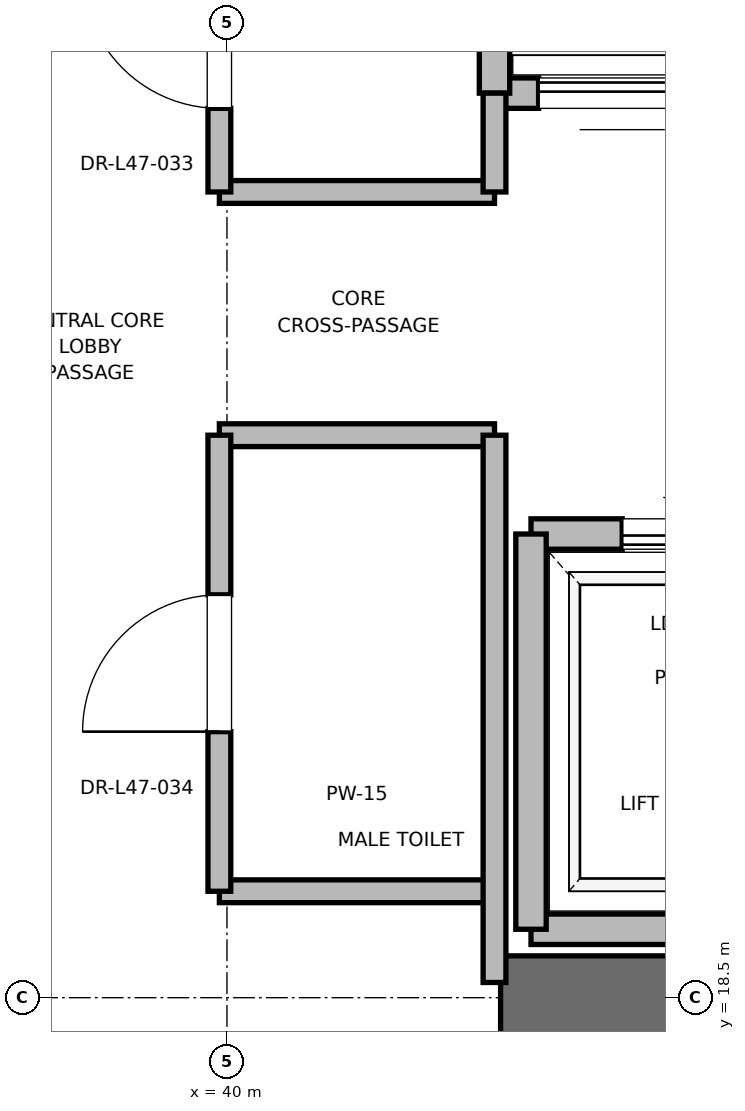
"""IFC4 building model, lengths in metres.
Left out: names, types, materials, properties, quantities, classifications, styles, units other than length and angle.
Written with IfcOpenShell. Run it as: python <this file> out.ifc"""

import sys

from ifc_helpers import new_model, si_unit, direction, frame, frame_2d, origin, place, context, subcontext, project, spatial, rectangle, extrude, element, fill, save


model = new_model("IFC4")
c1 = context("Model", 3, precision=1e-05, world=origin(), true_north=direction((0.0, 1.0)))
c2 = subcontext(c1, "Body", "Model", "MODEL_VIEW")
j1 = project(units=[si_unit("LENGTHUNIT", "METRE"), si_unit("PLANEANGLEUNIT", "RADIAN")], contexts=[c1])
p1 = place(None, origin())
s1 = spatial("IfcSite", under=j1, at=p1, CompositionType="ELEMENT")
p2 = place(p1, origin())
s2 = spatial("IfcBuilding", under=s1, at=p2, CompositionType="ELEMENT")
p3 = place(p2, frame((0.0, 0.0, 205.2)))
s3 = spatial("IfcBuildingStorey", under=s2, at=p3, CompositionType="ELEMENT", Elevation=205.2)
p4 = place(p3, frame((41.8, 18.5, 0.0), z_axis=(0.0, 0.0, 1.0), x_axis=(1.0, 0.0, 0.0)))
e1 = element("IfcWall", 1, at=p4, inside=s3, PredefinedType="SHEAR", context=c2, shape_type="SweptSolid", body=[
    extrude(rectangle(XDim=9.2, YDim=0.55, at=frame_2d((4.6, 0.0))), origin(), (0.0, 0.0, 1.0), 3.775),
])
p5 = place(p3, frame((42.0, 18.95, 0.0), z_axis=(0.0, 0.0, 1.0), x_axis=(1.0, 0.0, 0.0)))
e2 = element("IfcWall", 2, at=p5, inside=s3, PredefinedType="SOLIDWALL", context=c2, shape_type="SweptSolid", body=[
    extrude(rectangle(XDim=2.3, YDim=0.2, at=frame_2d((1.15, 0.0))), origin(), (0.0, 0.0, 1.0), 2.755),
])
p6 = place(p3, frame((44.3, 21.55, 0.0), z_axis=(0.0, 0.0, 1.0), x_axis=(-1.0, 0.0, 0.0)))
e3 = element("IfcWall", 3, at=p6, inside=s3, PredefinedType="SOLIDWALL", context=c2, shape_type="SweptSolid", body=[
    extrude(rectangle(XDim=2.3, YDim=0.2, at=frame_2d((1.15, 0.0))), origin(), (0.0, 0.0, 1.0), 3.775),
])
p7 = place(p6, frame((0.6, 0.0, 0.0)))
e4 = element("IfcOpeningElement", 4, at=p7, cuts=e3, PredefinedType="OPENING", context=c2, shape_type="SweptSolid", body=[
    extrude(rectangle(XDim=1.1, YDim=2.2, at=frame_2d((0.55, 1.1))), frame((0.0, 0.1, 0.0), z_axis=(0.0, -1.0, 0.0), x_axis=(1.0, 0.0, 0.0)), (0.0, 0.0, 1.0), 0.2),
])
p8 = place(p3, frame((42.0, 21.55, 0.0), z_axis=(0.0, 0.0, 1.0), x_axis=(0.0, -1.0, 0.0)))
e5 = element("IfcWall", 5, at=p8, inside=s3, PredefinedType="SOLIDWALL", context=c2, shape_type="SweptSolid", body=[
    extrude(rectangle(XDim=2.6, YDim=0.2, at=frame_2d((1.3, 0.0))), origin(), (0.0, 0.0, 1.0), 2.755),
])
p9 = place(p3, frame((41.76, 24.45, 0.0), z_axis=(0.0, 0.0, 1.0), x_axis=(1.0, 0.0, 0.0)))
e6 = element("IfcWall", 6, at=p9, inside=s3, PredefinedType="SOLIDWALL", context=c2, shape_type="SweptSolid", body=[
    extrude(rectangle(XDim=1.68, YDim=0.2, at=frame_2d((0.84, 0.0))), origin(), (0.0, 0.0, 1.0), 3.775),
])
p10 = place(p9, frame((0.29, 0.0, 0.0)))
e7 = element("IfcOpeningElement", 7, at=p10, cuts=e6, PredefinedType="OPENING", context=c2, shape_type="SweptSolid", body=[
    extrude(rectangle(XDim=1.1, YDim=2.2, at=frame_2d((0.55, 1.1))), frame((0.0, 0.1, 0.0), z_axis=(0.0, -1.0, 0.0), x_axis=(1.0, 0.0, 0.0)), (0.0, 0.0, 1.0), 0.2),
])
p11 = place(p3, frame((41.76, 27.05, 0.0), z_axis=(0.0, 0.0, 1.0), x_axis=(0.0, -1.0, 0.0)))
e8 = element("IfcWall", 8, at=p11, inside=s3, PredefinedType="SOLIDWALL", context=c2, shape_type="SweptSolid", body=[
    extrude(rectangle(XDim=2.6, YDim=0.2, at=frame_2d((1.3, 0.0))), origin(), (0.0, 0.0, 1.0), 3.775),
])
for number, where, z_axis, x_axis in (
    (9, (39.95, 19.2, 0.0), (0.0, 0.0, 1.0), (1.0, 0.0, 0.0)),
    (10, (39.95, 22.2, 0.0), (0.0, 0.0, 1.0), (1.0, 0.0, 0.0)),
    (11, (39.95, 23.8, 0.0), (0.0, 0.0, 1.0), (1.0, 0.0, 0.0)),
):
    element("IfcWall", number, at=place(p3, frame(where, z_axis=z_axis, x_axis=x_axis)), inside=s3, PredefinedType="PARTITIONING", context=c2, shape_type="SweptSolid", body=[
        extrude(rectangle(XDim=1.81, YDim=0.15, at=frame_2d((0.905, 0.0))), origin(), (0.0, 0.0, 1.0), 2.85),
    ])
p12 = place(p3, frame((41.76, 18.6, 0.0), z_axis=(0.0, 0.0, 1.0), x_axis=(0.0, 1.0, 0.0)))
e12 = element("IfcWall", 12, at=p12, inside=s3, PredefinedType="PARTITIONING", context=c2, shape_type="SweptSolid", body=[
    extrude(rectangle(XDim=3.6, YDim=0.15, at=frame_2d((1.8, 0.0))), origin(), (0.0, 0.0, 1.0), 2.755),
])
p13 = place(p3, frame((41.76, 23.8, 0.0), z_axis=(0.0, 0.0, 1.0), x_axis=(0.0, 1.0, 0.0)))
e13 = element("IfcWall", 13, at=p13, inside=s3, PredefinedType="PARTITIONING", context=c2, shape_type="SweptSolid", body=[
    extrude(rectangle(XDim=0.65, YDim=0.15, at=frame_2d((0.325, 0.0))), origin(), (0.0, 0.0, 1.0), 2.85),
])
p14 = place(p3, frame((39.95, 19.2, 0.0), z_axis=(0.0, 0.0, 1.0), x_axis=(0.0, 1.0, 0.0)))
e14 = element("IfcWall", 14, at=p14, inside=s3, PredefinedType="PARTITIONING", context=c2, shape_type="SweptSolid", body=[
    extrude(rectangle(XDim=3.0, YDim=0.15, at=frame_2d((1.5, 0.0))), origin(), (0.0, 0.0, 1.0), 2.85),
])
p15 = place(p14, frame((1.05, 0.0, 0.0)))
e15 = element("IfcOpeningElement", 15, at=p15, cuts=e14, PredefinedType="OPENING", context=c2, shape_type="SweptSolid", body=[
    extrude(rectangle(XDim=0.9, YDim=2.1, at=frame_2d((0.45, 1.05))), frame((0.0, 0.075, 0.0), z_axis=(0.0, -1.0, 0.0), x_axis=(1.0, 0.0, 0.0)), (0.0, 0.0, 1.0), 0.15),
])
p16 = place(p3, frame((39.95, 23.8, 0.0), z_axis=(0.0, 0.0, 1.0), x_axis=(0.0, 1.0, 0.0)))
e16 = element("IfcWall", 16, at=p16, inside=s3, PredefinedType="PARTITIONING", context=c2, shape_type="SweptSolid", body=[
    extrude(rectangle(XDim=2.0, YDim=0.15, at=frame_2d((1.0, 0.0))), origin(), (0.0, 0.0, 1.0), 2.85),
])
p17 = place(p16, frame((0.55, 0.0, 0.0)))
e17 = element("IfcOpeningElement", 17, at=p17, cuts=e16, PredefinedType="OPENING", context=c2, shape_type="SweptSolid", body=[
    extrude(rectangle(XDim=0.9, YDim=2.1, at=frame_2d((0.45, 1.05))), frame((0.0, 0.075, 0.0), z_axis=(0.0, -1.0, 0.0), x_axis=(1.0, 0.0, 0.0)), (0.0, 0.0, 1.0), 0.15),
])
p18 = place(p7, origin())
e18 = element("IfcDoor", 18, at=p18, inside=s3, OperationType="SLIDING_TO_RIGHT", PredefinedType="DOOR", context=c2, shape_type="SweptSolid", body=[
    extrude(rectangle(XDim=1.1, YDim=2.2, at=frame_2d((0.55, 1.1))), frame((0.0, 0.025, 0.0), z_axis=(0.0, -1.0, 0.0), x_axis=(1.0, 0.0, 0.0)), (0.0, 0.0, 1.0), 0.05),
])
fill(e4, e18)
p19 = place(p10, origin())
e19 = element("IfcDoor", 19, at=p19, inside=s3, OperationType="SLIDING_TO_RIGHT", PredefinedType="DOOR", context=c2, shape_type="SweptSolid", body=[
    extrude(rectangle(XDim=1.1, YDim=2.2, at=frame_2d((0.55, 1.1))), frame((0.0, 0.025, 0.0), z_axis=(0.0, -1.0, 0.0), x_axis=(1.0, 0.0, 0.0)), (0.0, 0.0, 1.0), 0.05),
])
fill(e7, e19)
p20 = place(p15, origin())
e20 = element("IfcDoor", 20, at=p20, inside=s3, OperationType="SINGLE_SWING_LEFT", PredefinedType="DOOR", context=c2, shape_type="SweptSolid", body=[
    extrude(rectangle(XDim=0.9, YDim=2.1, at=frame_2d((0.45, 1.05))), frame((0.0, 0.025, 0.0), z_axis=(0.0, -1.0, 0.0), x_axis=(1.0, 0.0, 0.0)), (0.0, 0.0, 1.0), 0.05),
])
fill(e15, e20)
p21 = place(p17, origin())
e21 = element("IfcDoor", 21, at=p21, inside=s3, OperationType="SINGLE_SWING_RIGHT", PredefinedType="DOOR", context=c2, shape_type="SweptSolid", body=[
    extrude(rectangle(XDim=0.9, YDim=2.1, at=frame_2d((0.45, 1.05))), frame((0.0, 0.025, 0.0), z_axis=(0.0, -1.0, 0.0), x_axis=(1.0, 0.0, 0.0)), (0.0, 0.0, 1.0), 0.05),
])
fill(e17, e21)
save(model, sys.argv[1])
